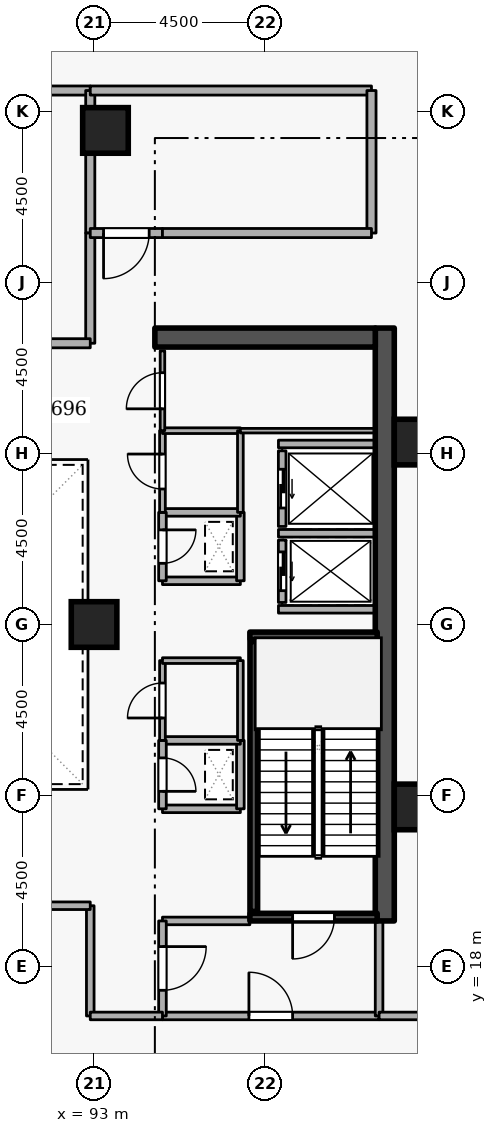
"""IFC4 building model, lengths in metres.
Left out: names, types, materials, properties, quantities, classifications, styles, units other than length and angle.
Written with IfcOpenShell. Run it as: python <this file> out.ifc"""

import sys

from ifc_helpers import new_model, si_unit, direction, frame, frame_2d, origin, origin_2d, place, context, subcontext, project, spatial, rectangle, extrude, element, fill, save


model = new_model("IFC4")
c1 = context("Model", 3, precision=1e-05, world=origin(), true_north=direction((0.0, 1.0)))
c2 = subcontext(c1, "Body", "Model", "MODEL_VIEW")
j1 = project(units=[si_unit("LENGTHUNIT", "METRE"), si_unit("PLANEANGLEUNIT", "RADIAN")], contexts=[c1])
p1 = place(None, origin())
s1 = spatial("IfcSite", under=j1, at=p1, CompositionType="ELEMENT")
p2 = place(p1, origin())
s2 = spatial("IfcBuilding", under=s1, at=p2, CompositionType="ELEMENT")
p3 = place(p2, frame((0.0, 0.0, 141.3)))
s3 = spatial("IfcBuildingStorey", under=s2, at=p3, CompositionType="ELEMENT", Elevation=141.3)
p4 = place(p3, frame((100.65, 19.2, 0.0), z_axis=(0.0, 0.0, 1.0), x_axis=(0.0, 1.0, 0.0)))
e1 = element("IfcWall", 1, at=p4, inside=s3, PredefinedType="SHEAR", context=c2, shape_type="SweptSolid", body=[
    extrude(rectangle(XDim=15.6, YDim=0.5, at=frame_2d((7.8, 0.0))), origin(), (0.0, 0.0, 1.0), 4.2),
])
p5 = place(p3, frame((94.6, 34.55, 0.0), z_axis=(0.0, 0.0, 1.0), x_axis=(1.0, 0.0, 0.0)))
e2 = element("IfcWall", 2, at=p5, inside=s3, PredefinedType="SHEAR", context=c2, shape_type="SweptSolid", body=[
    extrude(rectangle(XDim=5.8, YDim=0.5, at=frame_2d((2.9, 0.0))), origin(), (0.0, 0.0, 1.0), 4.2),
])
for number, where, z_axis, x_axis in (
    (3, (93.3, 40.0, 0.0), (0.0, 0.0, 1.0), (1.0, 0.0, 0.0)),
    (4, (101.5, 22.2, 0.0), (0.0, 0.0, 1.0), (1.0, 0.0, 0.0)),
    (5, (101.5, 31.8, 0.0), (0.0, 0.0, 1.0), (1.0, 0.0, 0.0)),
    (6, (93.0, 27.0, 0.0), (0.0, 0.0, 1.0), (1.0, 0.0, 0.0)),
):
    element("IfcColumn", number, at=place(p3, frame(where, z_axis=z_axis, x_axis=x_axis)), inside=s3, PredefinedType="COLUMN", context=c2, shape_type="SweptSolid", body=[
        extrude(rectangle(XDim=1.2, YDim=1.2, at=origin_2d()), origin(), (0.0, 0.0, 1.0), 4.2),
    ])
p6 = place(p3, frame((97.95, 29.22, 0.0), z_axis=(0.0, 0.0, 1.0), x_axis=(0.0, -1.0, 0.0)))
e7 = element("IfcWall", 7, at=p6, inside=s3, PredefinedType="STANDARD", context=c2, shape_type="SweptSolid", body=[
    extrude(rectangle(XDim=1.64, YDim=0.2, at=frame_2d((0.82, 0.0))), origin(), (0.0, 0.0, 1.0), 3.94),
])
p7 = place(p6, frame((0.31, 0.0, 0.0)))
e8 = element("IfcOpeningElement", 8, at=p7, cuts=e7, PredefinedType="OPENING", context=c2, shape_type="SweptSolid", body=[
    extrude(rectangle(XDim=1.02, YDim=2.06, at=frame_2d((0.51, 1.03))), frame((0.0, 0.11, 0.0), z_axis=(0.0, -1.0, 0.0), x_axis=(1.0, 0.0, 0.0)), (0.0, 0.0, 1.0), 0.22),
])
p8 = place(p3, frame((97.95, 31.57, 0.0), z_axis=(0.0, 0.0, 1.0), x_axis=(0.0, -1.0, 0.0)))
e9 = element("IfcWall", 9, at=p8, inside=s3, PredefinedType="STANDARD", context=c2, shape_type="SweptSolid", body=[
    extrude(rectangle(XDim=1.99, YDim=0.2, at=frame_2d((0.995, 0.0))), origin(), (0.0, 0.0, 1.0), 3.94),
])
p9 = place(p8, frame((0.485, 0.0, 0.0)))
e10 = element("IfcOpeningElement", 10, at=p9, cuts=e9, PredefinedType="OPENING", context=c2, shape_type="SweptSolid", body=[
    extrude(rectangle(XDim=1.02, YDim=2.06, at=frame_2d((0.51, 1.03))), frame((0.0, 0.11, 0.0), z_axis=(0.0, -1.0, 0.0), x_axis=(1.0, 0.0, 0.0)), (0.0, 0.0, 1.0), 0.22),
])
for number, where, z_axis, x_axis in (
    (11, (97.852, 29.4, 0.0), (0.0, 0.0, 1.0), (1.0, 0.0, 0.0)),
    (12, (97.852, 27.4, 0.0), (0.0, 0.0, 1.0), (1.0, 0.0, 0.0)),
    (13, (97.852, 31.75, 0.0), (0.0, 0.0, 1.0), (1.0, 0.0, 0.0)),
):
    element("IfcWall", number, at=place(p3, frame(where, z_axis=z_axis, x_axis=x_axis)), inside=s3, PredefinedType="STANDARD", context=c2, shape_type="SweptSolid", body=[
        extrude(rectangle(XDim=2.536, YDim=0.2, at=frame_2d((1.268, 0.0))), origin(), (0.0, 0.0, 1.0), 3.94),
    ])
p10 = place(p3, frame((100.45, 19.3, 0.0), z_axis=(0.0, 0.0, 1.0), x_axis=(-1.0, 0.0, 0.0)))
e14 = element("IfcWall", 14, at=p10, inside=s3, PredefinedType="SHEAR", context=c2, shape_type="SweptSolid", body=[
    extrude(rectangle(XDim=3.35, YDim=0.2, at=frame_2d((1.675, 0.0))), origin(), (0.0, 0.0, 1.0), 4.2),
])
p11 = place(p10, frame((1.125, 0.0, 0.0)))
e15 = element("IfcOpeningElement", 15, at=p11, cuts=e14, PredefinedType="OPENING", context=c2, shape_type="SweptSolid", body=[
    extrude(rectangle(XDim=1.1, YDim=2.1, at=frame_2d((0.55, 1.05))), frame((0.0, 0.11, 0.0), z_axis=(0.0, -1.0, 0.0), x_axis=(1.0, 0.0, 0.0)), (0.0, 0.0, 1.0), 0.22),
])
p12 = place(p3, frame((97.1, 26.7, 0.0), z_axis=(0.0, 0.0, 1.0), x_axis=(1.0, 0.0, 0.0)))
e16 = element("IfcWall", 16, at=p12, inside=s3, PredefinedType="SHEAR", context=c2, shape_type="SweptSolid", body=[
    extrude(rectangle(XDim=3.35, YDim=0.2, at=frame_2d((1.675, 0.0))), origin(), (0.0, 0.0, 1.0), 4.2),
])
p13 = place(p3, frame((97.203, 26.55, 0.0), z_axis=(0.0, 0.0, 1.0), x_axis=(0.0, -1.0, 0.0)))
e17 = element("IfcWall", 17, at=p13, inside=s3, PredefinedType="SHEAR", context=c2, shape_type="SweptSolid", body=[
    extrude(rectangle(XDim=7.1, YDim=0.2, at=frame_2d((3.55, 0.0))), origin(), (0.0, 0.0, 1.0), 4.2),
])
p14 = place(p3, frame((94.8, 16.7, 0.0), z_axis=(0.0, 0.0, 1.0), x_axis=(1.0, 0.0, 0.0)))
e18 = element("IfcWall", 18, at=p14, inside=s3, PredefinedType="STANDARD", context=c2, shape_type="SweptSolid", body=[
    extrude(rectangle(XDim=5.7, YDim=0.2, at=frame_2d((2.85, 0.0))), origin(), (0.0, 0.0, 1.0), 3.94),
])
p15 = place(p14, frame((2.275, 0.0, 0.0)))
e19 = element("IfcOpeningElement", 19, at=p15, cuts=e18, PredefinedType="OPENING", context=c2, shape_type="SweptSolid", body=[
    extrude(rectangle(XDim=1.15, YDim=2.1, at=frame_2d((0.575, 1.05))), frame((0.0, 0.11, 0.0), z_axis=(0.0, -1.0, 0.0), x_axis=(1.0, 0.0, 0.0)), (0.0, 0.0, 1.0), 0.22),
])
p16 = place(p3, frame((100.5, 16.7, 0.0), z_axis=(0.0, 0.0, 1.0), x_axis=(0.0, 1.0, 0.0)))
e20 = element("IfcWall", 20, at=p16, inside=s3, PredefinedType="STANDARD", context=c2, shape_type="SweptSolid", body=[
    extrude(rectangle(XDim=2.5, YDim=0.2, at=frame_2d((1.25, 0.0))), origin(), (0.0, 0.0, 1.0), 3.94),
])
p17 = place(p3, frame((97.1, 19.2, 0.0), z_axis=(0.0, 0.0, 1.0), x_axis=(-1.0, 0.0, 0.0)))
e21 = element("IfcWall", 21, at=p17, inside=s3, PredefinedType="STANDARD", context=c2, shape_type="SweptSolid", body=[
    extrude(rectangle(XDim=2.3, YDim=0.2, at=frame_2d((1.15, 0.0))), origin(), (0.0, 0.0, 1.0), 3.145),
])
p18 = place(p3, frame((94.8, 19.2, 0.0), z_axis=(0.0, 0.0, 1.0), x_axis=(0.0, -1.0, 0.0)))
e22 = element("IfcWall", 22, at=p18, inside=s3, PredefinedType="STANDARD", context=c2, shape_type="SweptSolid", body=[
    extrude(rectangle(XDim=2.5, YDim=0.2, at=frame_2d((1.25, 0.0))), origin(), (0.0, 0.0, 1.0), 3.94),
])
p19 = place(p18, frame((0.675, 0.0, 0.0)))
e23 = element("IfcOpeningElement", 23, at=p19, cuts=e22, PredefinedType="OPENING", context=c2, shape_type="SweptSolid", body=[
    extrude(rectangle(XDim=1.15, YDim=2.1, at=frame_2d((0.575, 1.05))), frame((0.0, 0.11, 0.0), z_axis=(0.0, -1.0, 0.0), x_axis=(1.0, 0.0, 0.0)), (0.0, 0.0, 1.0), 0.22),
])
p20 = place(p3, frame((94.8, 28.15, 0.0), z_axis=(0.0, 0.0, 1.0), x_axis=(1.0, 0.0, 0.0)))
e24 = element("IfcWall", 24, at=p20, inside=s3, PredefinedType="STANDARD", context=c2, shape_type="SweptSolid", body=[
    extrude(rectangle(XDim=2.05, YDim=0.2, at=frame_2d((1.025, 0.0))), origin(), (0.0, 0.0, 1.0), 3.94),
])
p21 = place(p3, frame((96.85, 28.15, 0.0), z_axis=(0.0, 0.0, 1.0), x_axis=(0.0, 1.0, 0.0)))
e25 = element("IfcWall", 25, at=p21, inside=s3, PredefinedType="STANDARD", context=c2, shape_type="SweptSolid", body=[
    extrude(rectangle(XDim=1.8, YDim=0.2, at=frame_2d((0.9, 0.0))), origin(), (0.0, 0.0, 1.0), 3.94),
])
p22 = place(p3, frame((96.85, 29.95, 0.0), z_axis=(0.0, 0.0, 1.0), x_axis=(-1.0, 0.0, 0.0)))
e26 = element("IfcWall", 26, at=p22, inside=s3, PredefinedType="STANDARD", context=c2, shape_type="SweptSolid", body=[
    extrude(rectangle(XDim=2.05, YDim=0.2, at=frame_2d((1.025, 0.0))), origin(), (0.0, 0.0, 1.0), 3.94),
])
p23 = place(p3, frame((94.8, 29.95, 0.0), z_axis=(0.0, 0.0, 1.0), x_axis=(0.0, -1.0, 0.0)))
e27 = element("IfcWall", 27, at=p23, inside=s3, PredefinedType="STANDARD", context=c2, shape_type="SweptSolid", body=[
    extrude(rectangle(XDim=1.8, YDim=0.2, at=frame_2d((0.9, 0.0))), origin(), (0.0, 0.0, 1.0), 3.94),
])
p24 = place(p23, frame((0.46, 0.0, 0.0)))
e28 = element("IfcOpeningElement", 28, at=p24, cuts=e27, PredefinedType="OPENING", context=c2, shape_type="SweptSolid", body=[
    extrude(rectangle(XDim=0.88, YDim=2.04, at=frame_2d((0.44, 1.02))), frame((0.0, 0.11, 0.0), z_axis=(0.0, -1.0, 0.0), x_axis=(1.0, 0.0, 0.0)), (0.0, 0.0, 1.0), 0.22),
])
p25 = place(p3, frame((94.8, 22.15, 0.0), z_axis=(0.0, 0.0, 1.0), x_axis=(1.0, 0.0, 0.0)))
e29 = element("IfcWall", 29, at=p25, inside=s3, PredefinedType="STANDARD", context=c2, shape_type="SweptSolid", body=[
    extrude(rectangle(XDim=2.05, YDim=0.2, at=frame_2d((1.025, 0.0))), origin(), (0.0, 0.0, 1.0), 3.94),
])
p26 = place(p3, frame((96.85, 22.15, 0.0), z_axis=(0.0, 0.0, 1.0), x_axis=(0.0, 1.0, 0.0)))
e30 = element("IfcWall", 30, at=p26, inside=s3, PredefinedType="STANDARD", context=c2, shape_type="SweptSolid", body=[
    extrude(rectangle(XDim=1.8, YDim=0.2, at=frame_2d((0.9, 0.0))), origin(), (0.0, 0.0, 1.0), 3.94),
])
p27 = place(p3, frame((96.85, 23.95, 0.0), z_axis=(0.0, 0.0, 1.0), x_axis=(-1.0, 0.0, 0.0)))
e31 = element("IfcWall", 31, at=p27, inside=s3, PredefinedType="STANDARD", context=c2, shape_type="SweptSolid", body=[
    extrude(rectangle(XDim=2.05, YDim=0.2, at=frame_2d((1.025, 0.0))), origin(), (0.0, 0.0, 1.0), 3.94),
])
p28 = place(p3, frame((94.8, 23.95, 0.0), z_axis=(0.0, 0.0, 1.0), x_axis=(0.0, -1.0, 0.0)))
e32 = element("IfcWall", 32, at=p28, inside=s3, PredefinedType="STANDARD", context=c2, shape_type="SweptSolid", body=[
    extrude(rectangle(XDim=1.8, YDim=0.2, at=frame_2d((0.9, 0.0))), origin(), (0.0, 0.0, 1.0), 3.94),
])
p29 = place(p28, frame((0.46, 0.0, 0.0)))
e33 = element("IfcOpeningElement", 33, at=p29, cuts=e32, PredefinedType="OPENING", context=c2, shape_type="SweptSolid", body=[
    extrude(rectangle(XDim=0.88, YDim=2.04, at=frame_2d((0.44, 1.02))), frame((0.0, 0.11, 0.0), z_axis=(0.0, -1.0, 0.0), x_axis=(1.0, 0.0, 0.0)), (0.0, 0.0, 1.0), 0.22),
])
p30 = place(p3, frame((88.5, 41.05, 0.0), z_axis=(0.0, 0.0, 1.0), x_axis=(1.0, 0.0, 0.0)))
e34 = element("IfcWall", 34, at=p30, inside=s3, PredefinedType="STANDARD", context=c2, shape_type="SweptSolid", body=[
    extrude(rectangle(XDim=4.4, YDim=0.24, at=frame_2d((2.2, 0.0))), origin(), (0.0, 0.0, 1.0), 3.94),
])
p31 = place(p3, frame((92.9, 41.05, 0.0), z_axis=(0.0, 0.0, 1.0), x_axis=(0.0, -1.0, 0.0)))
e35 = element("IfcWall", 35, at=p31, inside=s3, PredefinedType="STANDARD", context=c2, shape_type="SweptSolid", body=[
    extrude(rectangle(XDim=3.75, YDim=0.24, at=frame_2d((1.875, 0.0))), origin(), (0.0, 0.0, 1.0), 3.94),
])
p32 = place(p3, frame((92.9, 37.3, 0.0), z_axis=(0.0, 0.0, 1.0), x_axis=(0.0, -1.0, 0.0)))
e36 = element("IfcWall", 36, at=p32, inside=s3, PredefinedType="STANDARD", context=c2, shape_type="SweptSolid", body=[
    extrude(rectangle(XDim=2.9, YDim=0.24, at=frame_2d((1.45, 0.0))), origin(), (0.0, 0.0, 1.0), 3.94),
])
p33 = place(p3, frame((92.9, 34.4, 0.0), z_axis=(0.0, 0.0, 1.0), x_axis=(-1.0, 0.0, 0.0)))
e37 = element("IfcWall", 37, at=p33, inside=s3, PredefinedType="STANDARD", context=c2, shape_type="SweptSolid", body=[
    extrude(rectangle(XDim=4.4, YDim=0.24, at=frame_2d((2.2, 0.0))), origin(), (0.0, 0.0, 1.0), 3.145),
])
p34 = place(p33, frame((1.6, 0.0, 0.0)))
e38 = element("IfcOpeningElement", 38, at=p34, cuts=e37, PredefinedType="OPENING", context=c2, shape_type="SweptSolid", body=[
    extrude(rectangle(XDim=1.2, YDim=2.1, at=frame_2d((0.6, 1.05))), frame((0.0, 0.13, 0.0), z_axis=(0.0, -1.0, 0.0), x_axis=(1.0, 0.0, 0.0)), (0.0, 0.0, 1.0), 0.26),
])
p35 = place(p3, frame((92.9, 19.6, 0.0), z_axis=(0.0, 0.0, 1.0), x_axis=(0.0, -1.0, 0.0)))
e39 = element("IfcWall", 39, at=p35, inside=s3, PredefinedType="STANDARD", context=c2, shape_type="SweptSolid", body=[
    extrude(rectangle(XDim=2.9, YDim=0.2, at=frame_2d((1.45, 0.0))), origin(), (0.0, 0.0, 1.0), 3.94),
])
p36 = place(p3, frame((92.9, 16.7, 0.0), z_axis=(0.0, 0.0, 1.0), x_axis=(1.0, 0.0, 0.0)))
e40 = element("IfcWall", 40, at=p36, inside=s3, PredefinedType="STANDARD", context=c2, shape_type="SweptSolid", body=[
    extrude(rectangle(XDim=1.9, YDim=0.2, at=frame_2d((0.95, 0.0))), origin(), (0.0, 0.0, 1.0), 3.94),
])
p37 = place(p3, frame((100.5, 16.7, 0.0), z_axis=(0.0, 0.0, 1.0), x_axis=(1.0, 0.0, 0.0)))
e41 = element("IfcWall", 41, at=p37, inside=s3, PredefinedType="STANDARD", context=c2, shape_type="SweptSolid", body=[
    extrude(rectangle(XDim=2.088, YDim=0.2, at=frame_2d((1.044, 0.0))), origin(), (0.0, 0.0, 1.0), 3.94),
])
p38 = place(p3, frame((88.5, 19.6, 0.0), z_axis=(0.0, 0.0, 1.0), x_axis=(1.0, 0.0, 0.0)))
e42 = element("IfcWall", 42, at=p38, inside=s3, PredefinedType="STANDARD", context=c2, shape_type="SweptSolid", body=[
    extrude(rectangle(XDim=4.4, YDim=0.2, at=frame_2d((2.2, 0.0))), origin(), (0.0, 0.0, 1.0), 3.145),
])
p39 = place(p3, frame((94.8, 37.3, 0.0), z_axis=(0.0, 0.0, 1.0), x_axis=(-1.0, 0.0, 0.0)))
e43 = element("IfcWall", 43, at=p39, inside=s3, PredefinedType="STANDARD", context=c2, shape_type="SweptSolid", body=[
    extrude(rectangle(XDim=1.9, YDim=0.24, at=frame_2d((0.95, 0.0))), origin(), (0.0, 0.0, 1.0), 3.94),
])
p40 = place(p39, frame((0.35, 0.0, 0.0)))
e44 = element("IfcOpeningElement", 44, at=p40, cuts=e43, PredefinedType="OPENING", context=c2, shape_type="SweptSolid", body=[
    extrude(rectangle(XDim=1.2, YDim=2.1, at=frame_2d((0.6, 1.05))), frame((0.0, 0.13, 0.0), z_axis=(0.0, -1.0, 0.0), x_axis=(1.0, 0.0, 0.0)), (0.0, 0.0, 1.0), 0.26),
])
p41 = place(p3, frame((92.9, 41.05, 0.0), z_axis=(0.0, 0.0, 1.0), x_axis=(1.0, 0.0, 0.0)))
e45 = element("IfcWall", 45, at=p41, inside=s3, PredefinedType="STANDARD", context=c2, shape_type="SweptSolid", body=[
    extrude(rectangle(XDim=7.4, YDim=0.24, at=frame_2d((3.7, 0.0))), origin(), (0.0, 0.0, 1.0), 3.94),
])
p42 = place(p3, frame((100.3, 41.05, 0.0), z_axis=(0.0, 0.0, 1.0), x_axis=(0.0, -1.0, 0.0)))
e46 = element("IfcWall", 46, at=p42, inside=s3, PredefinedType="STANDARD", context=c2, shape_type="SweptSolid", body=[
    extrude(rectangle(XDim=3.75, YDim=0.24, at=frame_2d((1.875, 0.0))), origin(), (0.0, 0.0, 1.0), 3.94),
])
p43 = place(p3, frame((100.3, 37.3, 0.0), z_axis=(0.0, 0.0, 1.0), x_axis=(-1.0, 0.0, 0.0)))
e47 = element("IfcWall", 47, at=p43, inside=s3, PredefinedType="STANDARD", context=c2, shape_type="SweptSolid", body=[
    extrude(rectangle(XDim=5.5, YDim=0.24, at=frame_2d((2.75, 0.0))), origin(), (0.0, 0.0, 1.0), 3.94),
])
p44 = place(p3, frame((94.8, 23.95, 0.0), z_axis=(0.0, 0.0, 1.0), x_axis=(0.0, 1.0, 0.0)))
e48 = element("IfcWall", 48, at=p44, inside=s3, PredefinedType="PARTITIONING", context=c2, shape_type="SweptSolid", body=[
    extrude(rectangle(XDim=2.1, YDim=0.15, at=frame_2d((1.05, 0.0))), origin(), (0.0, 0.0, 1.0), 3.94),
])
p45 = place(p44, frame((0.59, 0.0, 0.0)))
e49 = element("IfcOpeningElement", 49, at=p45, cuts=e48, PredefinedType="OPENING", context=c2, shape_type="SweptSolid", body=[
    extrude(rectangle(XDim=0.92, YDim=2.08, at=frame_2d((0.46, 1.04))), frame((0.0, 0.085, 0.0), z_axis=(0.0, -1.0, 0.0), x_axis=(1.0, 0.0, 0.0)), (0.0, 0.0, 1.0), 0.17),
])
p46 = place(p3, frame((94.8, 26.05, 0.0), z_axis=(0.0, 0.0, 1.0), x_axis=(1.0, 0.0, 0.0)))
e50 = element("IfcWall", 50, at=p46, inside=s3, PredefinedType="PARTITIONING", context=c2, shape_type="SweptSolid", body=[
    extrude(rectangle(XDim=2.05, YDim=0.15, at=frame_2d((1.025, 0.0))), origin(), (0.0, 0.0, 1.0), 3.94),
])
p47 = place(p3, frame((96.85, 26.05, 0.0), z_axis=(0.0, 0.0, 1.0), x_axis=(0.0, -1.0, 0.0)))
e51 = element("IfcWall", 51, at=p47, inside=s3, PredefinedType="PARTITIONING", context=c2, shape_type="SweptSolid", body=[
    extrude(rectangle(XDim=2.1, YDim=0.15, at=frame_2d((1.05, 0.0))), origin(), (0.0, 0.0, 1.0), 3.94),
])
p48 = place(p3, frame((94.8, 29.95, 0.0), z_axis=(0.0, 0.0, 1.0), x_axis=(0.0, 1.0, 0.0)))
e52 = element("IfcWall", 52, at=p48, inside=s3, PredefinedType="PARTITIONING", context=c2, shape_type="SweptSolid", body=[
    extrude(rectangle(XDim=2.15, YDim=0.15, at=frame_2d((1.075, 0.0))), origin(), (0.0, 0.0, 1.0), 3.94),
])
p49 = place(p48, frame((0.615, 0.0, 0.0)))
e53 = element("IfcOpeningElement", 53, at=p49, cuts=e52, PredefinedType="OPENING", context=c2, shape_type="SweptSolid", body=[
    extrude(rectangle(XDim=0.92, YDim=2.08, at=frame_2d((0.46, 1.04))), frame((0.0, 0.085, 0.0), z_axis=(0.0, -1.0, 0.0), x_axis=(1.0, 0.0, 0.0)), (0.0, 0.0, 1.0), 0.17),
])
p50 = place(p3, frame((94.8, 32.1, 0.0), z_axis=(0.0, 0.0, 1.0), x_axis=(1.0, 0.0, 0.0)))
e54 = element("IfcWall", 54, at=p50, inside=s3, PredefinedType="PARTITIONING", context=c2, shape_type="SweptSolid", body=[
    extrude(rectangle(XDim=2.05, YDim=0.15, at=frame_2d((1.025, 0.0))), origin(), (0.0, 0.0, 1.0), 3.94),
])
p51 = place(p3, frame((96.85, 32.1, 0.0), z_axis=(0.0, 0.0, 1.0), x_axis=(0.0, -1.0, 0.0)))
e55 = element("IfcWall", 55, at=p51, inside=s3, PredefinedType="PARTITIONING", context=c2, shape_type="SweptSolid", body=[
    extrude(rectangle(XDim=2.15, YDim=0.15, at=frame_2d((1.075, 0.0))), origin(), (0.0, 0.0, 1.0), 3.94),
])
p52 = place(p3, frame((94.8, 32.1, 0.0), z_axis=(0.0, 0.0, 1.0), x_axis=(0.0, 1.0, 0.0)))
e56 = element("IfcWall", 56, at=p52, inside=s3, PredefinedType="PARTITIONING", context=c2, shape_type="SweptSolid", body=[
    extrude(rectangle(XDim=2.1, YDim=0.12, at=frame_2d((1.05, 0.0))), origin(), (0.0, 0.0, 1.0), 3.94),
])
p53 = place(p52, frame((0.575, 0.0, 0.0)))
e57 = element("IfcOpeningElement", 57, at=p53, cuts=e56, PredefinedType="OPENING", context=c2, shape_type="SweptSolid", body=[
    extrude(rectangle(XDim=0.95, YDim=2.1, at=frame_2d((0.475, 1.05))), frame((0.0, 0.07, 0.0), z_axis=(0.0, -1.0, 0.0), x_axis=(1.0, 0.0, 0.0)), (0.0, 0.0, 1.0), 0.14),
])
p54 = place(p3, frame((100.4, 32.1, 0.0), z_axis=(0.0, 0.0, 1.0), x_axis=(-1.0, 0.0, 0.0)))
e58 = element("IfcWall", 58, at=p54, inside=s3, PredefinedType="PARTITIONING", context=c2, shape_type="SweptSolid", body=[
    extrude(rectangle(XDim=3.55, YDim=0.12, at=frame_2d((1.775, 0.0))), origin(), (0.0, 0.0, 1.0), 3.94),
])
p55 = place(p7, origin())
e59 = element("IfcDoor", 59, at=p55, inside=s3, OperationType="SLIDING_TO_LEFT", PredefinedType="DOOR", context=c2, shape_type="SweptSolid", body=[
    extrude(rectangle(XDim=1.02, YDim=2.06, at=frame_2d((0.51, 1.03))), frame((0.0, 0.025, 0.0), z_axis=(0.0, -1.0, 0.0), x_axis=(1.0, 0.0, 0.0)), (0.0, 0.0, 1.0), 0.05),
])
fill(e8, e59)
p56 = place(p9, origin())
e60 = element("IfcDoor", 60, at=p56, inside=s3, OperationType="SLIDING_TO_LEFT", PredefinedType="DOOR", context=c2, shape_type="SweptSolid", body=[
    extrude(rectangle(XDim=1.02, YDim=2.06, at=frame_2d((0.51, 1.03))), frame((0.0, 0.025, 0.0), z_axis=(0.0, -1.0, 0.0), x_axis=(1.0, 0.0, 0.0)), (0.0, 0.0, 1.0), 0.05),
])
fill(e10, e60)
p57 = place(p11, origin())
e61 = element("IfcDoor", 61, at=p57, inside=s3, OperationType="SINGLE_SWING_RIGHT", PredefinedType="DOOR", context=c2, shape_type="SweptSolid", body=[
    extrude(rectangle(XDim=1.1, YDim=2.1, at=frame_2d((0.55, 1.05))), frame((0.0, 0.025, 0.0), z_axis=(0.0, -1.0, 0.0), x_axis=(1.0, 0.0, 0.0)), (0.0, 0.0, 1.0), 0.05),
])
fill(e15, e61)
p58 = place(p19, origin())
e62 = element("IfcDoor", 62, at=p58, inside=s3, OperationType="SINGLE_SWING_LEFT", PredefinedType="DOOR", context=c2, shape_type="SweptSolid", body=[
    extrude(rectangle(XDim=1.15, YDim=2.1, at=frame_2d((0.575, 1.05))), frame((0.0, 0.025, 0.0), z_axis=(0.0, -1.0, 0.0), x_axis=(1.0, 0.0, 0.0)), (0.0, 0.0, 1.0), 0.05),
])
fill(e23, e62)
p59 = place(p24, origin())
e63 = element("IfcDoor", 63, at=p59, inside=s3, OperationType="SINGLE_SWING_LEFT", PredefinedType="DOOR", context=c2, shape_type="SweptSolid", body=[
    extrude(rectangle(XDim=0.88, YDim=2.04, at=frame_2d((0.44, 1.02))), frame((0.0, 0.025, 0.0), z_axis=(0.0, -1.0, 0.0), x_axis=(1.0, 0.0, 0.0)), (0.0, 0.0, 1.0), 0.05),
])
fill(e28, e63)
p60 = place(p29, origin())
e64 = element("IfcDoor", 64, at=p60, inside=s3, OperationType="SINGLE_SWING_RIGHT", PredefinedType="DOOR", context=c2, shape_type="SweptSolid", body=[
    extrude(rectangle(XDim=0.88, YDim=2.04, at=frame_2d((0.44, 1.02))), frame((0.0, 0.025, 0.0), z_axis=(0.0, -1.0, 0.0), x_axis=(1.0, 0.0, 0.0)), (0.0, 0.0, 1.0), 0.05),
])
fill(e33, e64)
p61 = place(p45, origin())
e65 = element("IfcDoor", 65, at=p61, inside=s3, OperationType="SINGLE_SWING_LEFT", PredefinedType="DOOR", context=c2, shape_type="SweptSolid", body=[
    extrude(rectangle(XDim=0.92, YDim=2.08, at=frame_2d((0.46, 1.04))), frame((0.0, 0.025, 0.0), z_axis=(0.0, -1.0, 0.0), x_axis=(1.0, 0.0, 0.0)), (0.0, 0.0, 1.0), 0.05),
])
fill(e49, e65)
p62 = place(p49, origin())
e66 = element("IfcDoor", 66, at=p62, inside=s3, OperationType="SINGLE_SWING_RIGHT", PredefinedType="DOOR", context=c2, shape_type="SweptSolid", body=[
    extrude(rectangle(XDim=0.92, YDim=2.08, at=frame_2d((0.46, 1.04))), frame((0.0, 0.025, 0.0), z_axis=(0.0, -1.0, 0.0), x_axis=(1.0, 0.0, 0.0)), (0.0, 0.0, 1.0), 0.05),
])
fill(e53, e66)
p63 = place(p53, origin())
e67 = element("IfcDoor", 67, at=p63, inside=s3, OperationType="SINGLE_SWING_LEFT", PredefinedType="DOOR", context=c2, shape_type="SweptSolid", body=[
    extrude(rectangle(XDim=0.95, YDim=2.1, at=frame_2d((0.475, 1.05))), frame((0.0, 0.025, 0.0), z_axis=(0.0, -1.0, 0.0), x_axis=(1.0, 0.0, 0.0)), (0.0, 0.0, 1.0), 0.05),
])
fill(e57, e67)
p64 = place(p15, origin())
e68 = element("IfcDoor", 68, at=p64, inside=s3, OperationType="SINGLE_SWING_LEFT", PredefinedType="DOOR", context=c2, shape_type="SweptSolid", body=[
    extrude(rectangle(XDim=1.15, YDim=2.1, at=frame_2d((0.575, 1.05))), frame((0.0, 0.025, 0.0), z_axis=(0.0, -1.0, 0.0), x_axis=(1.0, 0.0, 0.0)), (0.0, 0.0, 1.0), 0.05),
])
fill(e19, e68)
p65 = place(p40, origin())
e69 = element("IfcDoor", 69, at=p65, inside=s3, OperationType="SINGLE_SWING_RIGHT", PredefinedType="DOOR", context=c2, shape_type="SweptSolid", body=[
    extrude(rectangle(XDim=1.2, YDim=2.1, at=frame_2d((0.6, 1.05))), frame((0.0, 0.025, 0.0), z_axis=(0.0, -1.0, 0.0), x_axis=(1.0, 0.0, 0.0)), (0.0, 0.0, 1.0), 0.05),
])
fill(e44, e69)
save(model, sys.argv[1])
